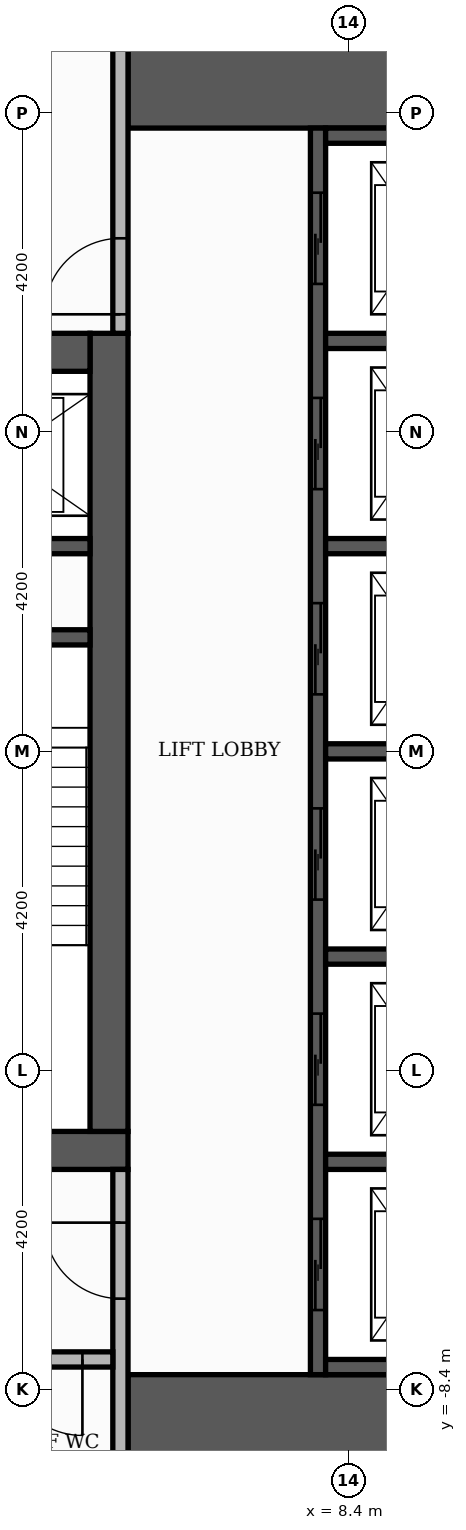
"""IFC4 building model, lengths in metres.
Left out: names, types, materials, properties, quantities, classifications, styles, units other than length and angle.
Written with IfcOpenShell. Run it as: python <this file> out.ifc"""

import sys

from ifc_helpers import new_model, si_unit, direction, frame, frame_2d, origin, place, context, subcontext, project, spatial, rectangle, extrude, element, fill, save


model = new_model("IFC4")
c1 = context("Model", 3, precision=1e-05, world=origin(), true_north=direction((0.0, 1.0)))
c2 = subcontext(c1, "Body", "Model", "MODEL_VIEW")
j1 = project(units=[si_unit("LENGTHUNIT", "METRE"), si_unit("PLANEANGLEUNIT", "RADIAN")], contexts=[c1])
p1 = place(None, origin())
s1 = spatial("IfcSite", under=j1, at=p1, CompositionType="ELEMENT")
p2 = place(p1, origin())
s2 = spatial("IfcBuilding", under=s1, at=p2, CompositionType="ELEMENT")
p3 = place(p2, frame((0.0, 0.0, 267.9)))
s3 = spatial("IfcBuildingStorey", under=s2, at=p3, CompositionType="ELEMENT", Elevation=267.9)
p4 = place(p3, frame((-5.5, -5.25, 0.0), z_axis=(0.0, 0.0, 1.0), x_axis=(1.0, 0.0, 0.0)))
e1 = element("IfcWall", 1, at=p4, inside=s3, PredefinedType="SHEAR", context=c2, shape_type="SweptSolid", body=[
    extrude(rectangle(XDim=11.0, YDim=0.5, at=frame_2d((5.5, 0.0))), origin(), (0.0, 0.0, 1.0), 3.48),
])
p5 = place(p4, frame((4.9, 0.0, 0.0)))
e2 = element("IfcOpeningElement", 2, at=p5, cuts=e1, PredefinedType="OPENING", context=c2, shape_type="SweptSolid", body=[
    extrude(rectangle(XDim=1.2, YDim=2.1, at=frame_2d((0.6, 1.05))), frame((0.0, 0.26, 0.0), z_axis=(0.0, -1.0, 0.0), x_axis=(1.0, 0.0, 0.0)), (0.0, 0.0, 1.0), 0.52),
])
p6 = place(p3, frame((5.25, -5.0, 0.0), z_axis=(0.0, 0.0, 1.0), x_axis=(0.0, 1.0, 0.0)))
e3 = element("IfcWall", 3, at=p6, inside=s3, PredefinedType="SHEAR", context=c2, shape_type="SweptSolid", body=[
    extrude(rectangle(XDim=10.5, YDim=0.5, at=frame_2d((5.25, 0.0))), origin(), (0.0, 0.0, 1.0), 3.48),
])
p7 = place(p3, frame((-5.0, 5.25, 0.0), z_axis=(0.0, 0.0, 1.0), x_axis=(1.0, 0.0, 0.0)))
e4 = element("IfcWall", 4, at=p7, inside=s3, PredefinedType="SHEAR", context=c2, shape_type="SweptSolid", body=[
    extrude(rectangle(XDim=10.0, YDim=0.5, at=frame_2d((5.0, 0.0))), origin(), (0.0, 0.0, 1.0), 3.48),
])
p8 = place(p7, frame((4.4, 0.0, 0.0)))
e5 = element("IfcOpeningElement", 5, at=p8, cuts=e4, PredefinedType="OPENING", context=c2, shape_type="SweptSolid", body=[
    extrude(rectangle(XDim=1.2, YDim=2.1, at=frame_2d((0.6, 1.05))), frame((0.0, 0.26, 0.0), z_axis=(0.0, -1.0, 0.0), x_axis=(1.0, 0.0, 0.0)), (0.0, 0.0, 1.0), 0.52),
])
for number, where, z_axis, x_axis in (
    (6, (5.5, -9.15, 0.0), (0.0, 0.0, 1.0), (1.0, 0.0, 0.0)),
    (7, (5.5, 9.15, 0.0), (0.0, 0.0, 1.0), (1.0, 0.0, 0.0)),
):
    element("IfcWall", number, at=place(p3, frame(where, z_axis=z_axis, x_axis=x_axis)), inside=s3, PredefinedType="SHEAR", context=c2, shape_type="SweptSolid", body=[
        extrude(rectangle(XDim=4.6, YDim=1.9, at=frame_2d((2.3, 0.0))), origin(), (0.0, 0.0, 1.0), 3.48),
    ])
p9 = place(p3, frame((2.15, 1.5, 0.0), z_axis=(0.0, 0.0, 1.0), x_axis=(1.0, 0.0, 0.0)))
e8 = element("IfcWall", 8, at=p9, inside=s3, PredefinedType="SHEAR", context=c2, shape_type="SweptSolid", body=[
    extrude(rectangle(XDim=2.85, YDim=0.2, at=frame_2d((1.425, 0.0))), origin(), (0.0, 0.0, 1.0), 3.48),
])
p10 = place(p3, frame((8.0, -8.2, 0.0), z_axis=(0.0, 0.0, 1.0), x_axis=(0.0, 1.0, 0.0)))
e9 = element("IfcWall", 9, at=p10, inside=s3, PredefinedType="SHEAR", context=c2, shape_type="SweptSolid", body=[
    extrude(rectangle(XDim=16.4, YDim=0.2, at=frame_2d((8.2, 0.0))), origin(), (0.0, 0.0, 1.0), 3.48),
])
p11 = place(p10, frame((0.85, 0.0, 0.0)))
e10 = element("IfcOpeningElement", 10, at=p11, cuts=e9, PredefinedType="OPENING", context=c2, shape_type="SweptSolid", body=[
    extrude(rectangle(XDim=1.2, YDim=2.1, at=frame_2d((0.6, 1.05))), frame((0.0, 0.11, 0.0), z_axis=(0.0, -1.0, 0.0), x_axis=(1.0, 0.0, 0.0)), (0.0, 0.0, 1.0), 0.22),
])
p12 = place(p10, frame((3.55, 0.0, 0.0)))
e11 = element("IfcOpeningElement", 11, at=p12, cuts=e9, PredefinedType="OPENING", context=c2, shape_type="SweptSolid", body=[
    extrude(rectangle(XDim=1.2, YDim=2.1, at=frame_2d((0.6, 1.05))), frame((0.0, 0.11, 0.0), z_axis=(0.0, -1.0, 0.0), x_axis=(1.0, 0.0, 0.0)), (0.0, 0.0, 1.0), 0.22),
])
p13 = place(p10, frame((6.25, 0.0, 0.0)))
e12 = element("IfcOpeningElement", 12, at=p13, cuts=e9, PredefinedType="OPENING", context=c2, shape_type="SweptSolid", body=[
    extrude(rectangle(XDim=1.2, YDim=2.1, at=frame_2d((0.6, 1.05))), frame((0.0, 0.11, 0.0), z_axis=(0.0, -1.0, 0.0), x_axis=(1.0, 0.0, 0.0)), (0.0, 0.0, 1.0), 0.22),
])
p14 = place(p10, frame((8.95, 0.0, 0.0)))
e13 = element("IfcOpeningElement", 13, at=p14, cuts=e9, PredefinedType="OPENING", context=c2, shape_type="SweptSolid", body=[
    extrude(rectangle(XDim=1.2, YDim=2.1, at=frame_2d((0.6, 1.05))), frame((0.0, 0.11, 0.0), z_axis=(0.0, -1.0, 0.0), x_axis=(1.0, 0.0, 0.0)), (0.0, 0.0, 1.0), 0.22),
])
p15 = place(p10, frame((11.65, 0.0, 0.0)))
e14 = element("IfcOpeningElement", 14, at=p15, cuts=e9, PredefinedType="OPENING", context=c2, shape_type="SweptSolid", body=[
    extrude(rectangle(XDim=1.2, YDim=2.1, at=frame_2d((0.6, 1.05))), frame((0.0, 0.11, 0.0), z_axis=(0.0, -1.0, 0.0), x_axis=(1.0, 0.0, 0.0)), (0.0, 0.0, 1.0), 0.22),
])
p16 = place(p10, frame((14.35, 0.0, 0.0)))
e15 = element("IfcOpeningElement", 15, at=p16, cuts=e9, PredefinedType="OPENING", context=c2, shape_type="SweptSolid", body=[
    extrude(rectangle(XDim=1.2, YDim=2.1, at=frame_2d((0.6, 1.05))), frame((0.0, 0.11, 0.0), z_axis=(0.0, -1.0, 0.0), x_axis=(1.0, 0.0, 0.0)), (0.0, 0.0, 1.0), 0.22),
])
for number, where, z_axis, x_axis in (
    (16, (8.1, -8.1, 0.0), (0.0, 0.0, 1.0), (1.0, 0.0, 0.0)),
    (17, (8.1, -5.4, 0.0), (0.0, 0.0, 1.0), (1.0, 0.0, 0.0)),
    (18, (8.1, -2.7, 0.0), (0.0, 0.0, 1.0), (1.0, 0.0, 0.0)),
    (19, (8.1, 0.0, 0.0), (0.0, 0.0, 1.0), (1.0, 0.0, 0.0)),
):
    element("IfcWall", number, at=place(p3, frame(where, z_axis=z_axis, x_axis=x_axis)), inside=s3, PredefinedType="SHEAR", context=c2, shape_type="SweptSolid", body=[
        extrude(rectangle(XDim=2.0, YDim=0.2, at=frame_2d((1.0, 0.0))), origin(), (0.0, 0.0, 1.0), 3.48),
    ])
p17 = place(p3, frame((2.15, 2.7, 0.0), z_axis=(0.0, 0.0, 1.0), x_axis=(1.0, 0.0, 0.0)))
e20 = element("IfcWall", 20, at=p17, inside=s3, PredefinedType="SHEAR", context=c2, shape_type="SweptSolid", body=[
    extrude(rectangle(XDim=2.85, YDim=0.2, at=frame_2d((1.425, 0.0))), origin(), (0.0, 0.0, 1.0), 3.48),
])
for number, where, z_axis, x_axis in (
    (21, (8.1, 2.7, 0.0), (0.0, 0.0, 1.0), (1.0, 0.0, 0.0)),
    (22, (8.1, 5.4, 0.0), (0.0, 0.0, 1.0), (1.0, 0.0, 0.0)),
    (23, (8.1, 8.1, 0.0), (0.0, 0.0, 1.0), (1.0, 0.0, 0.0)),
):
    element("IfcWall", number, at=place(p3, frame(where, z_axis=z_axis, x_axis=x_axis)), inside=s3, PredefinedType="SHEAR", context=c2, shape_type="SweptSolid", body=[
        extrude(rectangle(XDim=2.0, YDim=0.2, at=frame_2d((1.0, 0.0))), origin(), (0.0, 0.0, 1.0), 3.48),
    ])
p18 = place(p3, frame((5.4, -10.1, 0.0), z_axis=(0.0, 0.0, 1.0), x_axis=(0.0, 1.0, 0.0)))
e24 = element("IfcWall", 24, at=p18, inside=s3, PredefinedType="PARTITIONING", context=c2, shape_type="SweptSolid", body=[
    extrude(rectangle(XDim=4.6, YDim=0.2, at=frame_2d((2.3, 0.0))), origin(), (0.0, 0.0, 1.0), 3.48),
])
p19 = place(p18, frame((2.9, 0.0, 0.0)))
e25 = element("IfcOpeningElement", 25, at=p19, cuts=e24, PredefinedType="OPENING", context=c2, shape_type="SweptSolid", body=[
    extrude(rectangle(XDim=1.0, YDim=2.1, at=frame_2d((0.5, 1.05))), frame((0.0, 0.11, 0.0), z_axis=(0.0, -1.0, 0.0), x_axis=(1.0, 0.0, 0.0)), (0.0, 0.0, 1.0), 0.22),
])
p20 = place(p3, frame((3.55, -8.0, 0.0), z_axis=(0.0, 0.0, 1.0), x_axis=(1.0, 0.0, 0.0)))
e26 = element("IfcWall", 26, at=p20, inside=s3, PredefinedType="PARTITIONING", context=c2, shape_type="SweptSolid", body=[
    extrude(rectangle(XDim=1.75, YDim=0.2, at=frame_2d((0.875, 0.0))), origin(), (0.0, 0.0, 1.0), 3.48),
])
p21 = place(p20, frame((0.35, 0.0, 0.0)))
e27 = element("IfcOpeningElement", 27, at=p21, cuts=e26, PredefinedType="OPENING", context=c2, shape_type="SweptSolid", body=[
    extrude(rectangle(XDim=1.0, YDim=2.1, at=frame_2d((0.5, 1.05))), frame((0.0, 0.11, 0.0), z_axis=(0.0, -1.0, 0.0), x_axis=(1.0, 0.0, 0.0)), (0.0, 0.0, 1.0), 0.22),
])
p22 = place(p3, frame((5.4, 5.5, 0.0), z_axis=(0.0, 0.0, 1.0), x_axis=(0.0, 1.0, 0.0)))
e28 = element("IfcWall", 28, at=p22, inside=s3, PredefinedType="PARTITIONING", context=c2, shape_type="SweptSolid", body=[
    extrude(rectangle(XDim=4.6, YDim=0.2, at=frame_2d((2.3, 0.0))), origin(), (0.0, 0.0, 1.0), 3.48),
])
p23 = place(p22, frame((0.25, 0.0, 0.0)))
e29 = element("IfcOpeningElement", 29, at=p23, cuts=e28, PredefinedType="OPENING", context=c2, shape_type="SweptSolid", body=[
    extrude(rectangle(XDim=1.0, YDim=2.1, at=frame_2d((0.5, 1.05))), frame((0.0, 0.11, 0.0), z_axis=(0.0, -1.0, 0.0), x_axis=(1.0, 0.0, 0.0)), (0.0, 0.0, 1.0), 0.22),
])
p24 = place(p11, origin())
e30 = element("IfcDoor", 30, at=p24, inside=s3, OperationType="SLIDING_TO_LEFT", PredefinedType="DOOR", context=c2, shape_type="SweptSolid", body=[
    extrude(rectangle(XDim=1.2, YDim=2.1, at=frame_2d((0.6, 1.05))), frame((0.0, 0.025, 0.0), z_axis=(0.0, -1.0, 0.0), x_axis=(1.0, 0.0, 0.0)), (0.0, 0.0, 1.0), 0.05),
])
fill(e10, e30)
p25 = place(p12, origin())
e31 = element("IfcDoor", 31, at=p25, inside=s3, OperationType="SLIDING_TO_LEFT", PredefinedType="DOOR", context=c2, shape_type="SweptSolid", body=[
    extrude(rectangle(XDim=1.2, YDim=2.1, at=frame_2d((0.6, 1.05))), frame((0.0, 0.025, 0.0), z_axis=(0.0, -1.0, 0.0), x_axis=(1.0, 0.0, 0.0)), (0.0, 0.0, 1.0), 0.05),
])
fill(e11, e31)
p26 = place(p13, origin())
e32 = element("IfcDoor", 32, at=p26, inside=s3, OperationType="SLIDING_TO_LEFT", PredefinedType="DOOR", context=c2, shape_type="SweptSolid", body=[
    extrude(rectangle(XDim=1.2, YDim=2.1, at=frame_2d((0.6, 1.05))), frame((0.0, 0.025, 0.0), z_axis=(0.0, -1.0, 0.0), x_axis=(1.0, 0.0, 0.0)), (0.0, 0.0, 1.0), 0.05),
])
fill(e12, e32)
p27 = place(p14, origin())
e33 = element("IfcDoor", 33, at=p27, inside=s3, OperationType="SLIDING_TO_LEFT", PredefinedType="DOOR", context=c2, shape_type="SweptSolid", body=[
    extrude(rectangle(XDim=1.2, YDim=2.1, at=frame_2d((0.6, 1.05))), frame((0.0, 0.025, 0.0), z_axis=(0.0, -1.0, 0.0), x_axis=(1.0, 0.0, 0.0)), (0.0, 0.0, 1.0), 0.05),
])
fill(e13, e33)
p28 = place(p15, origin())
e34 = element("IfcDoor", 34, at=p28, inside=s3, OperationType="SLIDING_TO_LEFT", PredefinedType="DOOR", context=c2, shape_type="SweptSolid", body=[
    extrude(rectangle(XDim=1.2, YDim=2.1, at=frame_2d((0.6, 1.05))), frame((0.0, 0.025, 0.0), z_axis=(0.0, -1.0, 0.0), x_axis=(1.0, 0.0, 0.0)), (0.0, 0.0, 1.0), 0.05),
])
fill(e14, e34)
p29 = place(p16, origin())
e35 = element("IfcDoor", 35, at=p29, inside=s3, OperationType="SLIDING_TO_LEFT", PredefinedType="DOOR", context=c2, shape_type="SweptSolid", body=[
    extrude(rectangle(XDim=1.2, YDim=2.1, at=frame_2d((0.6, 1.05))), frame((0.0, 0.025, 0.0), z_axis=(0.0, -1.0, 0.0), x_axis=(1.0, 0.0, 0.0)), (0.0, 0.0, 1.0), 0.05),
])
fill(e15, e35)
p30 = place(p23, origin())
e36 = element("IfcDoor", 36, at=p30, inside=s3, OperationType="SINGLE_SWING_LEFT", PredefinedType="DOOR", context=c2, shape_type="SweptSolid", body=[
    extrude(rectangle(XDim=1.0, YDim=2.1, at=frame_2d((0.5, 1.05))), frame((0.0, 0.025, 0.0), z_axis=(0.0, -1.0, 0.0), x_axis=(1.0, 0.0, 0.0)), (0.0, 0.0, 1.0), 0.05),
])
fill(e29, e36)
p31 = place(p19, origin())
e37 = element("IfcDoor", 37, at=p31, inside=s3, OperationType="SINGLE_SWING_RIGHT", PredefinedType="DOOR", context=c2, shape_type="SweptSolid", body=[
    extrude(rectangle(XDim=1.0, YDim=2.1, at=frame_2d((0.5, 1.05))), frame((0.0, 0.025, 0.0), z_axis=(0.0, -1.0, 0.0), x_axis=(1.0, 0.0, 0.0)), (0.0, 0.0, 1.0), 0.05),
])
fill(e25, e37)
p32 = place(p21, frame((1.0, 0.0, 0.0), z_axis=(0.0, 0.0, 1.0), x_axis=(-1.0, 0.0, 0.0)))
e38 = element("IfcDoor", 38, at=p32, inside=s3, OperationType="SINGLE_SWING_RIGHT", PredefinedType="DOOR", context=c2, shape_type="SweptSolid", body=[
    extrude(rectangle(XDim=1.0, YDim=2.1, at=frame_2d((0.5, 1.05))), frame((0.0, 0.025, 0.0), z_axis=(0.0, -1.0, 0.0), x_axis=(1.0, 0.0, 0.0)), (0.0, 0.0, 1.0), 0.05),
])
fill(e27, e38)
save(model, sys.argv[1])
